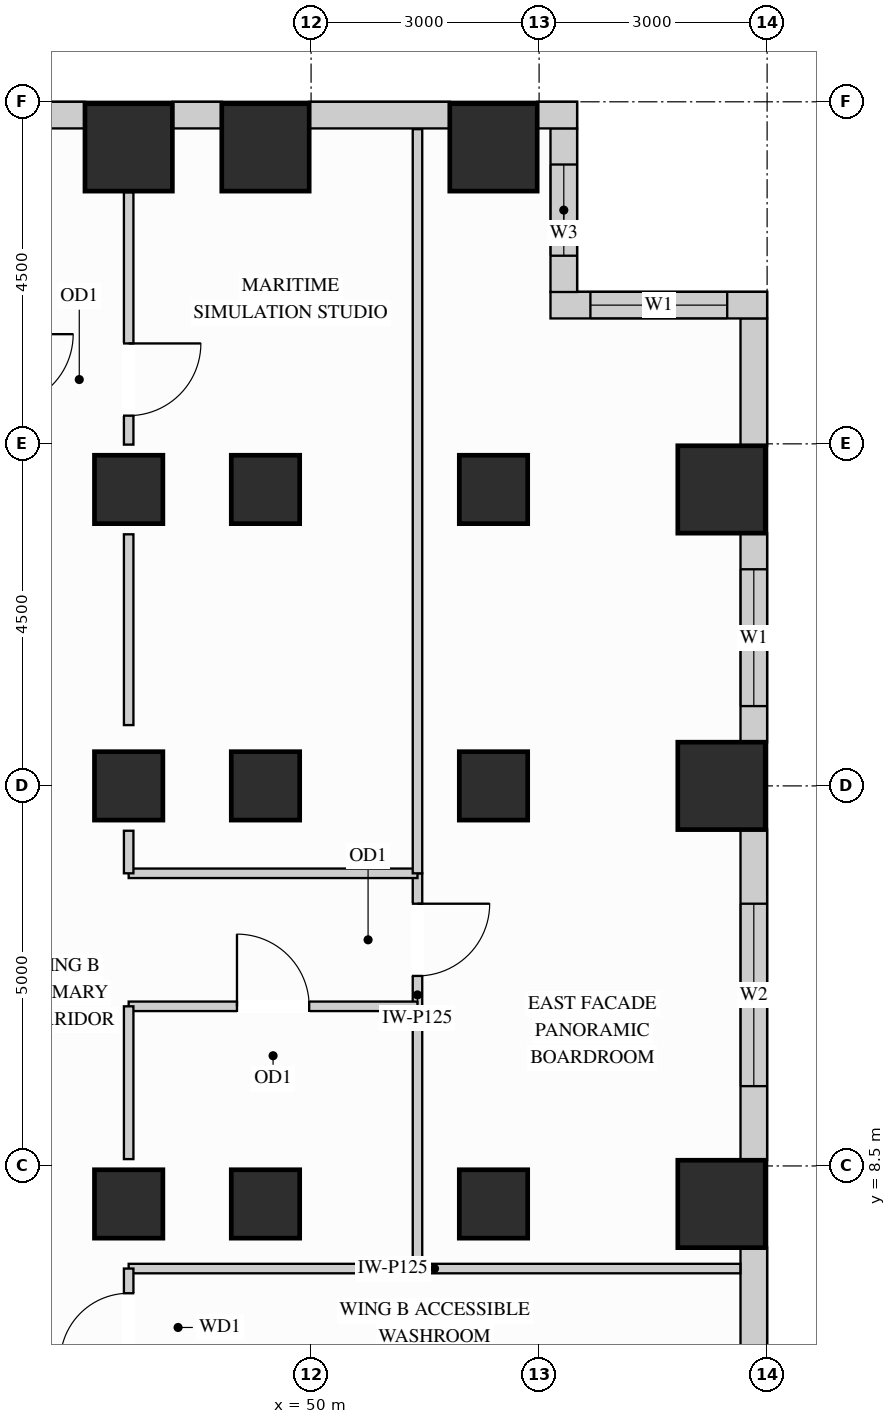
"""IFC4 building model, lengths in metres.
Left out: names, types, materials, properties, quantities, classifications, styles, units other than length and angle.
Written with IfcOpenShell. Run it as: python <this file> out.ifc"""

import sys

from ifc_helpers import new_model, si_unit, direction, frame, frame_2d, origin, origin_2d, place, context, subcontext, project, spatial, rectangle, extrude, source, transform, mapped, element, fill, save


model = new_model("IFC4")
c1 = context("Model", 3, precision=1e-05, world=origin(), true_north=direction((0.0, 1.0)))
c2 = subcontext(c1, "Body", "Model", "MODEL_VIEW")
j1 = project(units=[si_unit("LENGTHUNIT", "METRE"), si_unit("PLANEANGLEUNIT", "RADIAN")], contexts=[c1])
p1 = place(None, origin())
s1 = spatial("IfcSite", under=j1, at=p1, CompositionType="ELEMENT")
p2 = place(p1, origin())
s2 = spatial("IfcBuilding", under=s1, at=p2, CompositionType="ELEMENT")
p3 = place(p2, frame((0.0, 0.0, 127.8)))
s3 = spatial("IfcBuildingStorey", under=s2, at=p3, CompositionType="ELEMENT", Elevation=127.8)
m1 = source(origin(), c2, "Body", "SweptSolid", [
    extrude(rectangle(XDim=0.9, YDim=0.9, at=origin_2d()), origin(), (0.0, 0.0, 1.0), 3.38),
])
for number, where, z_axis, x_axis in (
    (1, (47.6, 13.5, 0.0), (0.0, 0.0, 1.0), (1.0, 0.0, 0.0)),
    (2, (47.6, 8.0, 0.0), (0.0, 0.0, 1.0), (1.0, 0.0, 0.0)),
    (3, (47.6, 17.4, 0.0), (0.0, 0.0, 1.0), (1.0, 0.0, 0.0)),
    (4, (49.4, 13.5, 0.0), (0.0, 0.0, 1.0), (1.0, 0.0, 0.0)),
    (5, (49.4, 17.4, 0.0), (0.0, 0.0, 1.0), (1.0, 0.0, 0.0)),
    (6, (49.4, 8.0, 0.0), (0.0, 0.0, 1.0), (1.0, 0.0, 0.0)),
    (7, (52.4, 13.5, 0.0), (0.0, 0.0, 1.0), (1.0, 0.0, 0.0)),
    (8, (52.4, 17.4, 0.0), (0.0, 0.0, 1.0), (1.0, 0.0, 0.0)),
    (9, (52.4, 8.0, 0.0), (0.0, 0.0, 1.0), (1.0, 0.0, 0.0)),
):
    element("IfcColumn", number, at=place(p3, frame(where, z_axis=z_axis, x_axis=x_axis)), inside=s3, PredefinedType="COLUMN", context=c2, shape_type="MappedRepresentation", body=[
        mapped(m1, transform((0.0, 0.0, 0.0), x_axis=(1.0, 0.0, 0.0), y_axis=(0.0, 1.0, 0.0), z_axis=(0.0, 0.0, 1.0))),
    ])
m2 = source(origin(), c2, "Body", "SweptSolid", [
    extrude(rectangle(XDim=1.15, YDim=1.15, at=origin_2d()), origin(), (0.0, 0.0, 1.0), 3.38),
])
for number, where, z_axis, x_axis in (
    (10, (47.6, 21.9, 0.0), (0.0, 0.0, 1.0), (1.0, 0.0, 0.0)),
    (11, (49.4, 21.9, 0.0), (0.0, 0.0, 1.0), (1.0, 0.0, 0.0)),
    (12, (52.4, 21.9, 0.0), (0.0, 0.0, 1.0), (1.0, 0.0, 0.0)),
    (13, (55.4, 13.5, 0.0), (0.0, 0.0, 1.0), (1.0, 0.0, 0.0)),
    (14, (55.4, 17.4, 0.0), (0.0, 0.0, 1.0), (1.0, 0.0, 0.0)),
    (15, (55.4, 8.0, 0.0), (0.0, 0.0, 1.0), (1.0, 0.0, 0.0)),
):
    element("IfcColumn", number, at=place(p3, frame(where, z_axis=z_axis, x_axis=x_axis)), inside=s3, PredefinedType="COLUMN", context=c2, shape_type="MappedRepresentation", body=[
        mapped(m2, transform((0.0, 0.0, 0.0), x_axis=(1.0, 0.0, 0.0), y_axis=(0.0, 1.0, 0.0), z_axis=(0.0, 0.0, 1.0))),
    ])
m3 = source(origin(), c2, "Body", "SweptSolid", [
    extrude(rectangle(XDim=3.354, YDim=0.35, at=frame_2d((1.677, 0.0))), origin(), (0.0, 0.0, 1.0), 3.365),
])
p4 = place(p3, frame((55.825, 4.073, 0.0), z_axis=(0.0, 0.0, 1.0), x_axis=(0.0, 1.0, 0.0)))
e16 = element("IfcWall", 16, at=p4, inside=s3, PredefinedType="SOLIDWALL", context=c2, shape_type="MappedRepresentation", body=[
    mapped(m3, transform((0.0, 0.0, 0.0), x_axis=(1.0, 0.0, 0.0), y_axis=(0.0, 1.0, 0.0), z_axis=(0.0, 0.0, 1.0))),
])
p5 = place(p3, frame((55.825, 8.573, 0.0), z_axis=(0.0, 0.0, 1.0), x_axis=(0.0, 1.0, 0.0)))
e17 = element("IfcWall", 17, at=p5, inside=s3, PredefinedType="SOLIDWALL", context=c2, shape_type="SweptSolid", body=[
    extrude(rectangle(XDim=4.354, YDim=0.35, at=frame_2d((2.177, 0.0))), origin(), (0.0, 0.0, 1.0), 3.365),
])
p6 = place(p5, frame((0.977, 0.0, 0.78)))
e18 = element("IfcOpeningElement", 18, at=p6, cuts=e17, PredefinedType="OPENING", context=c2, shape_type="SweptSolid", body=[
    extrude(rectangle(XDim=2.4, YDim=2.1, at=frame_2d((1.2, 1.05))), frame((0.0, 0.185, 0.0), z_axis=(0.0, -1.0, 0.0), x_axis=(1.0, 0.0, 0.0)), (0.0, 0.0, 1.0), 0.37),
])
p7 = place(p3, frame((55.825, 14.073, 0.0), z_axis=(0.0, 0.0, 1.0), x_axis=(0.0, 1.0, 0.0)))
e19 = element("IfcWall", 19, at=p7, inside=s3, PredefinedType="SOLIDWALL", context=c2, shape_type="SweptSolid", body=[
    extrude(rectangle(XDim=2.754, YDim=0.35, at=frame_2d((1.377, 0.0))), origin(), (0.0, 0.0, 1.0), 3.365),
])
p8 = place(p7, frame((0.477, 0.0, 0.78)))
e20 = element("IfcOpeningElement", 20, at=p8, cuts=e19, PredefinedType="OPENING", context=c2, shape_type="SweptSolid", body=[
    extrude(rectangle(XDim=1.8, YDim=2.1, at=frame_2d((0.9, 1.05))), frame((0.0, 0.185, 0.0), z_axis=(0.0, -1.0, 0.0), x_axis=(1.0, 0.0, 0.0)), (0.0, 0.0, 1.0), 0.37),
])
m4 = source(origin(), c2, "Body", "SweptSolid", [
    extrude(rectangle(XDim=1.679, YDim=0.35, at=frame_2d((0.84, 0.0))), origin(), (0.0, 0.0, 1.0), 3.365),
])
p9 = place(p3, frame((55.825, 17.973, 0.0), z_axis=(0.0, 0.0, 1.0), x_axis=(0.0, 1.0, 0.0)))
e21 = element("IfcWall", 21, at=p9, inside=s3, PredefinedType="SOLIDWALL", context=c2, shape_type="MappedRepresentation", body=[
    mapped(m4, transform((0.0, 0.0, 0.0), x_axis=(1.0, 0.0, 0.0), y_axis=(0.0, 1.0, 0.0), z_axis=(0.0, 0.0, 1.0))),
])
p10 = place(p3, frame((56.0, 19.825, 0.0), z_axis=(0.0, 0.0, 1.0), x_axis=(-1.0, 0.0, 0.0)))
e22 = element("IfcWall", 22, at=p10, inside=s3, PredefinedType="SOLIDWALL", context=c2, shape_type="SweptSolid", body=[
    extrude(rectangle(XDim=2.85, YDim=0.35, at=frame_2d((1.425, 0.0))), origin(), (0.0, 0.0, 1.0), 3.365),
])
p11 = place(p10, frame((0.525, 0.0, 0.78)))
e23 = element("IfcOpeningElement", 23, at=p11, cuts=e22, PredefinedType="OPENING", context=c2, shape_type="SweptSolid", body=[
    extrude(rectangle(XDim=1.8, YDim=2.1, at=frame_2d((0.9, 1.05))), frame((0.0, 0.185, 0.0), z_axis=(0.0, -1.0, 0.0), x_axis=(1.0, 0.0, 0.0)), (0.0, 0.0, 1.0), 0.37),
])
p12 = place(p3, frame((53.325, 19.998, 0.0), z_axis=(0.0, 0.0, 1.0), x_axis=(0.0, 1.0, 0.0)))
e24 = element("IfcWall", 24, at=p12, inside=s3, PredefinedType="SOLIDWALL", context=c2, shape_type="SweptSolid", body=[
    extrude(rectangle(XDim=2.154, YDim=0.35, at=frame_2d((1.077, 0.0))), origin(), (0.0, 0.0, 1.0), 3.365),
])
p13 = place(p12, frame((0.477, 0.0, 0.78)))
e25 = element("IfcOpeningElement", 25, at=p13, cuts=e24, PredefinedType="OPENING", context=c2, shape_type="SweptSolid", body=[
    extrude(rectangle(XDim=1.2, YDim=2.1, at=frame_2d((0.6, 1.05))), frame((0.0, 0.185, 0.0), z_axis=(0.0, -1.0, 0.0), x_axis=(1.0, 0.0, 0.0)), (0.0, 0.0, 1.0), 0.37),
])
m5 = source(origin(), c2, "Body", "SweptSolid", [
    extrude(rectangle(XDim=0.527, YDim=0.35, at=frame_2d((0.264, 0.0))), origin(), (0.0, 0.0, 1.0), 3.365),
])
p14 = place(p3, frame((53.5, 22.325, 0.0), z_axis=(0.0, 0.0, 1.0), x_axis=(-1.0, 0.0, 0.0)))
e26 = element("IfcWall", 26, at=p14, inside=s3, PredefinedType="SOLIDWALL", context=c2, shape_type="MappedRepresentation", body=[
    mapped(m5, transform((0.0, 0.0, 0.0), x_axis=(1.0, 0.0, 0.0), y_axis=(0.0, 1.0, 0.0), z_axis=(0.0, 0.0, 1.0))),
])
m6 = source(origin(), c2, "Body", "SweptSolid", [
    extrude(rectangle(XDim=1.854, YDim=0.35, at=frame_2d((0.927, 0.0))), origin(), (0.0, 0.0, 1.0), 3.365),
])
p15 = place(p3, frame((51.827, 22.325, 0.0), z_axis=(0.0, 0.0, 1.0), x_axis=(-1.0, 0.0, 0.0)))
e27 = element("IfcWall", 27, at=p15, inside=s3, PredefinedType="SOLIDWALL", context=c2, shape_type="MappedRepresentation", body=[
    mapped(m6, transform((0.0, 0.0, 0.0), x_axis=(1.0, 0.0, 0.0), y_axis=(0.0, 1.0, 0.0), z_axis=(0.0, 0.0, 1.0))),
])
m7 = source(origin(), c2, "Body", "SweptSolid", [
    extrude(rectangle(XDim=0.654, YDim=0.35, at=frame_2d((0.327, 0.0))), origin(), (0.0, 0.0, 1.0), 3.365),
])
p16 = place(p3, frame((48.827, 22.325, 0.0), z_axis=(0.0, 0.0, 1.0), x_axis=(-1.0, 0.0, 0.0)))
e28 = element("IfcWall", 28, at=p16, inside=s3, PredefinedType="SOLIDWALL", context=c2, shape_type="MappedRepresentation", body=[
    mapped(m7, transform((0.0, 0.0, 0.0), x_axis=(1.0, 0.0, 0.0), y_axis=(0.0, 1.0, 0.0), z_axis=(0.0, 0.0, 1.0))),
])
p17 = place(p3, frame((47.027, 22.325, 0.0), z_axis=(0.0, 0.0, 1.0), x_axis=(-1.0, 0.0, 0.0)))
e29 = element("IfcWall", 29, at=p17, inside=s3, PredefinedType="SOLIDWALL", context=c2, shape_type="SweptSolid", body=[
    extrude(rectangle(XDim=6.454, YDim=0.35, at=frame_2d((3.227, 0.0))), origin(), (0.0, 0.0, 1.0), 3.365),
])
p18 = place(p17, frame((1.749, 0.0, 0.78)))
e30 = element("IfcOpeningElement", 30, at=p18, cuts=e29, PredefinedType="OPENING", context=c2, shape_type="SweptSolid", body=[
    extrude(rectangle(XDim=1.8, YDim=2.1, at=frame_2d((0.9, 1.05))), frame((0.0, 0.185, 0.0), z_axis=(0.0, -1.0, 0.0), x_axis=(1.0, 0.0, 0.0)), (0.0, 0.0, 1.0), 0.37),
])
p19 = place(p17, frame((3.942, 0.0, 0.78)))
e31 = element("IfcOpeningElement", 31, at=p19, cuts=e29, PredefinedType="OPENING", context=c2, shape_type="SweptSolid", body=[
    extrude(rectangle(XDim=1.8, YDim=2.1, at=frame_2d((0.9, 1.05))), frame((0.0, 0.185, 0.0), z_axis=(0.0, -1.0, 0.0), x_axis=(1.0, 0.0, 0.0)), (0.0, 0.0, 1.0), 0.37),
])
p20 = place(p3, frame((51.4, 10.6, 0.0), z_axis=(0.0, 0.0, 1.0), x_axis=(0.0, 1.0, 0.0)))
e32 = element("IfcWall", 32, at=p20, inside=s3, PredefinedType="PARTITIONING", context=c2, shape_type="SweptSolid", body=[
    extrude(rectangle(XDim=1.75, YDim=0.125, at=frame_2d((0.875, 0.0))), origin(), (0.0, 0.0, 1.0), 3.365),
])
p21 = place(p20, frame((0.4, 0.0, 0.0)))
e33 = element("IfcOpeningElement", 33, at=p21, cuts=e32, PredefinedType="OPENING", context=c2, shape_type="SweptSolid", body=[
    extrude(rectangle(XDim=0.95, YDim=2.15, at=frame_2d((0.475, 1.075))), frame((0.0, 0.073, 0.0), z_axis=(0.0, -1.0, 0.0), x_axis=(1.0, 0.0, 0.0)), (0.0, 0.0, 1.0), 0.145),
])
m8 = source(origin(), c2, "Body", "SweptSolid", [
    extrude(rectangle(XDim=8.048, YDim=0.125, at=frame_2d((4.024, 0.0))), origin(), (0.0, 0.0, 1.0), 3.365),
])
p22 = place(p3, frame((47.6, 7.15, 0.0), z_axis=(0.0, 0.0, 1.0), x_axis=(1.0, 0.0, 0.0)))
e34 = element("IfcWall", 34, at=p22, inside=s3, PredefinedType="PARTITIONING", context=c2, shape_type="MappedRepresentation", body=[
    mapped(m8, transform((0.0, 0.0, 0.0), x_axis=(1.0, 0.0, 0.0), y_axis=(0.0, 1.0, 0.0), z_axis=(0.0, 0.0, 1.0))),
])
m9 = source(origin(), c2, "Body", "SweptSolid", [
    extrude(rectangle(XDim=3.8, YDim=0.125, at=frame_2d((1.9, 0.0))), origin(), (0.0, 0.0, 1.0), 3.365),
])
p23 = place(p3, frame((47.6, 12.35, 0.0), z_axis=(0.0, 0.0, 1.0), x_axis=(1.0, 0.0, 0.0)))
e35 = element("IfcWall", 35, at=p23, inside=s3, PredefinedType="PARTITIONING", context=c2, shape_type="MappedRepresentation", body=[
    mapped(m9, transform((0.0, 0.0, 0.0), x_axis=(1.0, 0.0, 0.0), y_axis=(0.0, 1.0, 0.0), z_axis=(0.0, 0.0, 1.0))),
])
p24 = place(p3, frame((47.6, 10.6, 0.0), z_axis=(0.0, 0.0, 1.0), x_axis=(1.0, 0.0, 0.0)))
e36 = element("IfcWall", 36, at=p24, inside=s3, PredefinedType="PARTITIONING", context=c2, shape_type="SweptSolid", body=[
    extrude(rectangle(XDim=3.8, YDim=0.125, at=frame_2d((1.9, 0.0))), origin(), (0.0, 0.0, 1.0), 2.677),
])
p25 = place(p24, frame((1.425, 0.0, 0.0)))
e37 = element("IfcOpeningElement", 37, at=p25, cuts=e36, PredefinedType="OPENING", context=c2, shape_type="SweptSolid", body=[
    extrude(rectangle(XDim=0.95, YDim=2.15, at=frame_2d((0.475, 1.075))), frame((0.0, 0.073, 0.0), z_axis=(0.0, -1.0, 0.0), x_axis=(1.0, 0.0, 0.0)), (0.0, 0.0, 1.0), 0.145),
])
m10 = source(origin(), c2, "Body", "SweptSolid", [
    extrude(rectangle(XDim=3.45, YDim=0.125, at=frame_2d((1.725, 0.0))), origin(), (0.0, 0.0, 1.0), 3.365),
])
p26 = place(p3, frame((51.4, 7.15, 0.0), z_axis=(0.0, 0.0, 1.0), x_axis=(0.0, 1.0, 0.0)))
e38 = element("IfcWall", 38, at=p26, inside=s3, PredefinedType="PARTITIONING", context=c2, shape_type="MappedRepresentation", body=[
    mapped(m10, transform((0.0, 0.0, 0.0), x_axis=(1.0, 0.0, 0.0), y_axis=(0.0, 1.0, 0.0), z_axis=(0.0, 0.0, 1.0))),
])
m11 = source(origin(), c2, "Body", "SweptSolid", [
    extrude(rectangle(XDim=9.79, YDim=0.125, at=frame_2d((4.895, 0.0))), origin(), (0.0, 0.0, 1.0), 3.365),
])
p27 = place(p3, frame((51.4, 12.35, 0.0), z_axis=(0.0, 0.0, 1.0), x_axis=(0.0, 1.0, 0.0)))
e39 = element("IfcWall", 39, at=p27, inside=s3, PredefinedType="PARTITIONING", context=c2, shape_type="MappedRepresentation", body=[
    mapped(m11, transform((0.0, 0.0, 0.0), x_axis=(1.0, 0.0, 0.0), y_axis=(0.0, 1.0, 0.0), z_axis=(0.0, 0.0, 1.0))),
])
m12 = source(origin(), c2, "Body", "SweptSolid", [
    extrude(rectangle(XDim=2.01, YDim=0.125, at=frame_2d((1.005, 0.0))), origin(), (0.0, 0.0, 1.0), 2.677),
])
p28 = place(p3, frame((47.6, 8.59, 0.0), z_axis=(0.0, 0.0, 1.0), x_axis=(0.0, 1.0, 0.0)))
e40 = element("IfcWall", 40, at=p28, inside=s3, PredefinedType="PARTITIONING", context=c2, shape_type="MappedRepresentation", body=[
    mapped(m12, transform((0.0, 0.0, 0.0), x_axis=(1.0, 0.0, 0.0), y_axis=(0.0, 1.0, 0.0), z_axis=(0.0, 0.0, 1.0))),
])
m13 = source(origin(), c2, "Body", "SweptSolid", [
    extrude(rectangle(XDim=2.51, YDim=0.125, at=frame_2d((1.255, 0.0))), origin(), (0.0, 0.0, 1.0), 2.677),
])
p29 = place(p3, frame((47.6, 14.3, 0.0), z_axis=(0.0, 0.0, 1.0), x_axis=(0.0, 1.0, 0.0)))
e41 = element("IfcWall", 41, at=p29, inside=s3, PredefinedType="PARTITIONING", context=c2, shape_type="MappedRepresentation", body=[
    mapped(m13, transform((0.0, 0.0, 0.0), x_axis=(1.0, 0.0, 0.0), y_axis=(0.0, 1.0, 0.0), z_axis=(0.0, 0.0, 1.0))),
])
p30 = place(p3, frame((47.6, 17.99, 0.0), z_axis=(0.0, 0.0, 1.0), x_axis=(0.0, 1.0, 0.0)))
e42 = element("IfcWall", 42, at=p30, inside=s3, PredefinedType="PARTITIONING", context=c2, shape_type="SweptSolid", body=[
    extrude(rectangle(XDim=3.32, YDim=0.125, at=frame_2d((1.66, 0.0))), origin(), (0.0, 0.0, 1.0), 2.677),
])
p31 = place(p30, frame((0.381, 0.0, 0.0)))
e43 = element("IfcOpeningElement", 43, at=p31, cuts=e42, PredefinedType="OPENING", context=c2, shape_type="SweptSolid", body=[
    extrude(rectangle(XDim=0.95, YDim=2.15, at=frame_2d((0.475, 1.075))), frame((0.0, 0.073, 0.0), z_axis=(0.0, -1.0, 0.0), x_axis=(1.0, 0.0, 0.0)), (0.0, 0.0, 1.0), 0.145),
])
m14 = source(origin(), c2, "Body", "SweptSolid", [
    extrude(rectangle(XDim=0.56, YDim=0.125, at=frame_2d((0.28, 0.0))), origin(), (0.0, 0.0, 1.0), 2.677),
])
p32 = place(p3, frame((47.6, 12.35, 0.0), z_axis=(0.0, 0.0, 1.0), x_axis=(0.0, 1.0, 0.0)))
e44 = element("IfcWall", 44, at=p32, inside=s3, PredefinedType="PARTITIONING", context=c2, shape_type="MappedRepresentation", body=[
    mapped(m14, transform((0.0, 0.0, 0.0), x_axis=(1.0, 0.0, 0.0), y_axis=(0.0, 1.0, 0.0), z_axis=(0.0, 0.0, 1.0))),
])
p33 = place(p3, frame((47.6, 5.65, 0.0), z_axis=(0.0, 0.0, 1.0), x_axis=(0.0, 1.0, 0.0)))
e45 = element("IfcWall", 45, at=p33, inside=s3, PredefinedType="PARTITIONING", context=c2, shape_type="SweptSolid", body=[
    extrude(rectangle(XDim=1.5, YDim=0.125, at=frame_2d((0.75, 0.0))), origin(), (0.0, 0.0, 1.0), 2.677),
])
p34 = place(p33, frame((0.275, 0.0, 0.0)))
e46 = element("IfcOpeningElement", 46, at=p34, cuts=e45, PredefinedType="OPENING", context=c2, shape_type="SweptSolid", body=[
    extrude(rectangle(XDim=0.9, YDim=2.15, at=frame_2d((0.45, 1.075))), frame((0.0, 0.073, 0.0), z_axis=(0.0, -1.0, 0.0), x_axis=(1.0, 0.0, 0.0)), (0.0, 0.0, 1.0), 0.145),
])
m15 = source(origin(), c2, "Body", "SweptSolid", [
    extrude(rectangle(XDim=0.95, YDim=2.15, at=frame_2d((0.475, 1.075))), frame((0.0, 0.025, 0.0), z_axis=(0.0, -1.0, 0.0), x_axis=(1.0, 0.0, 0.0)), (0.0, 0.0, 1.0), 0.05),
])
p35 = place(p25, origin())
e47 = element("IfcDoor", 47, at=p35, inside=s3, OperationType="SINGLE_SWING_LEFT", PredefinedType="DOOR", context=c2, shape_type="MappedRepresentation", body=[
    mapped(m15, transform((0.0, 0.0, 0.0), x_axis=(1.0, 0.0, 0.0), y_axis=(0.0, 1.0, 0.0), z_axis=(0.0, 0.0, 1.0))),
])
fill(e37, e47)
p36 = place(p21, origin())
e48 = element("IfcDoor", 48, at=p36, inside=s3, OperationType="SINGLE_SWING_RIGHT", PredefinedType="DOOR", context=c2, shape_type="MappedRepresentation", body=[
    mapped(m15, transform((0.0, 0.0, 0.0), x_axis=(1.0, 0.0, 0.0), y_axis=(0.0, 1.0, 0.0), z_axis=(0.0, 0.0, 1.0))),
])
fill(e33, e48)
p37 = place(p31, origin())
e49 = element("IfcDoor", 49, at=p37, inside=s3, OperationType="SINGLE_SWING_RIGHT", PredefinedType="DOOR", context=c2, shape_type="MappedRepresentation", body=[
    mapped(m15, transform((0.0, 0.0, 0.0), x_axis=(1.0, 0.0, 0.0), y_axis=(0.0, 1.0, 0.0), z_axis=(0.0, 0.0, 1.0))),
])
fill(e43, e49)
m16 = source(origin(), c2, "Body", "SweptSolid", [
    extrude(rectangle(XDim=0.9, YDim=2.15, at=frame_2d((0.45, 1.075))), frame((0.0, 0.025, 0.0), z_axis=(0.0, -1.0, 0.0), x_axis=(1.0, 0.0, 0.0)), (0.0, 0.0, 1.0), 0.05),
])
p38 = place(p34, origin())
e50 = element("IfcDoor", 50, at=p38, inside=s3, OperationType="SINGLE_SWING_LEFT", PredefinedType="DOOR", context=c2, shape_type="MappedRepresentation", body=[
    mapped(m16, transform((0.0, 0.0, 0.0), x_axis=(1.0, 0.0, 0.0), y_axis=(0.0, 1.0, 0.0), z_axis=(0.0, 0.0, 1.0))),
])
fill(e46, e50)
m17 = source(origin(), c2, "Body", "SweptSolid", [
    extrude(rectangle(XDim=1.8, YDim=2.1, at=frame_2d((0.9, 1.05))), frame((0.0, 0.03, 0.0), z_axis=(0.0, -1.0, 0.0), x_axis=(1.0, 0.0, 0.0)), (0.0, 0.0, 1.0), 0.06),
])
p39 = place(p8, origin())
e51 = element("IfcWindow", 51, at=p39, inside=s3, PartitioningType="SINGLE_PANEL", PredefinedType="WINDOW", context=c2, shape_type="MappedRepresentation", body=[
    mapped(m17, transform((0.0, 0.0, 0.0), x_axis=(1.0, 0.0, 0.0), y_axis=(0.0, 1.0, 0.0), z_axis=(0.0, 0.0, 1.0))),
])
fill(e20, e51)
p40 = place(p11, origin())
e52 = element("IfcWindow", 52, at=p40, inside=s3, PartitioningType="SINGLE_PANEL", PredefinedType="WINDOW", context=c2, shape_type="MappedRepresentation", body=[
    mapped(m17, transform((0.0, 0.0, 0.0), x_axis=(1.0, 0.0, 0.0), y_axis=(0.0, 1.0, 0.0), z_axis=(0.0, 0.0, 1.0))),
])
fill(e23, e52)
m18 = source(origin(), c2, "Body", "SweptSolid", [
    extrude(rectangle(XDim=2.4, YDim=2.1, at=frame_2d((1.2, 1.05))), frame((0.0, 0.03, 0.0), z_axis=(0.0, -1.0, 0.0), x_axis=(1.0, 0.0, 0.0)), (0.0, 0.0, 1.0), 0.06),
])
p41 = place(p6, origin())
e53 = element("IfcWindow", 53, at=p41, inside=s3, PartitioningType="SINGLE_PANEL", PredefinedType="WINDOW", context=c2, shape_type="MappedRepresentation", body=[
    mapped(m18, transform((0.0, 0.0, 0.0), x_axis=(1.0, 0.0, 0.0), y_axis=(0.0, 1.0, 0.0), z_axis=(0.0, 0.0, 1.0))),
])
fill(e18, e53)
m19 = source(origin(), c2, "Body", "SweptSolid", [
    extrude(rectangle(XDim=1.2, YDim=2.1, at=frame_2d((0.6, 1.05))), frame((0.0, 0.03, 0.0), z_axis=(0.0, -1.0, 0.0), x_axis=(1.0, 0.0, 0.0)), (0.0, 0.0, 1.0), 0.06),
])
p42 = place(p13, origin())
e54 = element("IfcWindow", 54, at=p42, inside=s3, PartitioningType="SINGLE_PANEL", PredefinedType="WINDOW", context=c2, shape_type="MappedRepresentation", body=[
    mapped(m19, transform((0.0, 0.0, 0.0), x_axis=(1.0, 0.0, 0.0), y_axis=(0.0, 1.0, 0.0), z_axis=(0.0, 0.0, 1.0))),
])
fill(e25, e54)
save(model, sys.argv[1])
